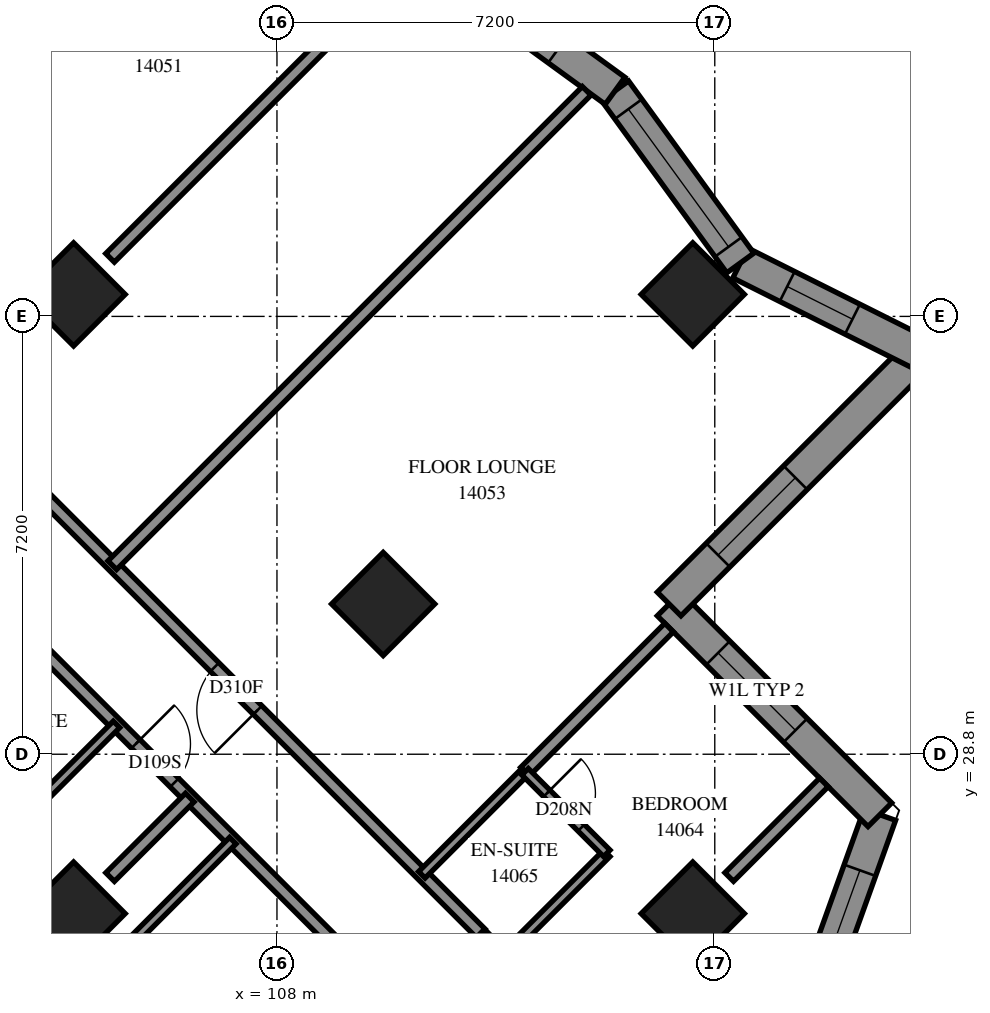
"""IFC4 building model, lengths in metres.
Left out: names, types, materials, properties, quantities, classifications, styles, units other than length and angle.
Written with IfcOpenShell. Run it as: python <this file> out.ifc"""

import sys

from ifc_helpers import new_model, si_unit, direction, frame, frame_2d, origin, origin_2d, place, context, subcontext, project, spatial, polyline, rectangle, outline, extrude, element, fill, save


model = new_model("IFC4")
c1 = context("Model", 3, precision=1e-05, world=origin(), true_north=direction((0.0, 1.0)))
c2 = subcontext(c1, "Body", "Model", "MODEL_VIEW")
j1 = project(units=[si_unit("LENGTHUNIT", "METRE"), si_unit("PLANEANGLEUNIT", "RADIAN")], contexts=[c1])
p1 = place(None, origin())
s1 = spatial("IfcSite", under=j1, at=p1, CompositionType="ELEMENT")
p2 = place(p1, origin())
s2 = spatial("IfcBuilding", under=s1, at=p2, CompositionType="ELEMENT")
p3 = place(p2, frame((0.0, 0.0, 54.2)))
s3 = spatial("IfcBuildingStorey", under=s2, at=p3, CompositionType="ELEMENT", Elevation=54.2)
for number, where, z_axis, x_axis in (
    (1, (104.656, 36.362, 0.0), (0.0, 0.0, 1.0), (0.707, -0.707, 0.0)),
    (2, (114.838, 36.362, 0.0), (0.0, 0.0, 1.0), (0.707, -0.707, 0.0)),
    (3, (109.747, 31.271, 0.0), (0.0, 0.0, 1.0), (0.707, -0.707, 0.0)),
    (4, (104.656, 26.18, 0.0), (0.0, 0.0, 1.0), (0.707, -0.707, 0.0)),
    (5, (114.838, 26.18, 0.0), (0.0, 0.0, 1.0), (0.707, -0.707, 0.0)),
):
    element("IfcColumn", number, at=place(p3, frame(where, z_axis=z_axis, x_axis=x_axis)), inside=s3, PredefinedType="COLUMN", context=c2, shape_type="SweptSolid", body=[
        extrude(rectangle(XDim=1.2, YDim=1.2, at=origin_2d()), origin(), (0.0, 0.0, 1.0), 3.1),
    ])
p4 = place(p3, frame((116.117, 22.793, 0.0), z_axis=(0.0, 0.0, 1.0), x_axis=(0.3376911299, 0.9412569791, 0.0)))
e6 = element("IfcWall", 6, at=p4, inside=s3, PredefinedType="SOLIDWALL", context=c2, shape_type="SweptSolid", body=[
    extrude(outline(polyline([(-0.124, -0.275), (5.499, -0.275), (5.15, 0.275), (0.124, 0.275), (-0.124, -0.275)])), origin(), (0.0, 0.0, 1.0), 3.1),
])
p5 = place(p4, frame((0.841, 0.0, 0.5)))
e7 = element("IfcOpeningElement", 7, at=p5, cuts=e6, PredefinedType="OPENING", context=c2, shape_type="SweptSolid", body=[
    extrude(rectangle(XDim=1.2, YDim=2.45, at=frame_2d((0.6, 1.225))), frame((0.0, 0.285, 0.0), z_axis=(0.0, -1.0, 0.0), x_axis=(1.0, 0.0, 0.0)), (0.0, 0.0, 1.0), 0.57),
])
p6 = place(p4, frame((3.154, 0.0, 0.5)))
e8 = element("IfcOpeningElement", 8, at=p6, cuts=e6, PredefinedType="OPENING", context=c2, shape_type="SweptSolid", body=[
    extrude(rectangle(XDim=1.2, YDim=2.45, at=frame_2d((0.6, 1.225))), frame((0.0, 0.285, 0.0), z_axis=(0.0, -1.0, 0.0), x_axis=(1.0, 0.0, 0.0)), (0.0, 0.0, 1.0), 0.57),
])
p7 = place(p3, frame((117.915, 27.805, 0.0), z_axis=(0.0, 0.0, 1.0), x_axis=(-0.7071067812, 0.7071067812, 0.0)))
e9 = element("IfcWall", 9, at=p7, inside=s3, PredefinedType="SOLIDWALL", context=c2, shape_type="SweptSolid", body=[
    extrude(outline(polyline([(-0.174, -0.275), (4.626, -0.275), (5.176, 0.275), (0.174, 0.275), (-0.174, -0.275)])), origin(), (0.0, 0.0, 1.0), 3.1),
])
p8 = place(p7, frame((1.963, 0.0, 0.6)))
e10 = element("IfcOpeningElement", 10, at=p8, cuts=e9, PredefinedType="OPENING", context=c2, shape_type="SweptSolid", body=[
    extrude(rectangle(XDim=1.8, YDim=1.9, at=frame_2d((0.9, 0.95))), frame((0.0, 0.285, 0.0), z_axis=(0.0, -1.0, 0.0), x_axis=(1.0, 0.0, 0.0)), (0.0, 0.0, 1.0), 0.57),
])
p9 = place(p3, frame((114.449, 31.271, 0.0), z_axis=(0.0, 0.0, 1.0), x_axis=(0.7070982134, 0.7071153489, 0.0)))
e11 = element("IfcWall", 11, at=p9, inside=s3, PredefinedType="SOLIDWALL", context=c2, shape_type="SweptSolid", body=[
    extrude(outline(polyline([(0.275, -0.275), (6.217, -0.275), (5.455, 0.275), (-0.275, 0.275), (0.275, -0.275)])), origin(), (0.0, 0.0, 1.0), 3.1),
])
p10 = place(p9, frame((1.137, 0.0, 0.6)))
e12 = element("IfcOpeningElement", 12, at=p10, cuts=e11, PredefinedType="OPENING", context=c2, shape_type="SweptSolid", body=[
    extrude(rectangle(XDim=1.8, YDim=1.9, at=frame_2d((0.9, 0.95))), frame((0.0, 0.285, 0.0), z_axis=(0.0, -1.0, 0.0), x_axis=(1.0, 0.0, 0.0)), (0.0, 0.0, 1.0), 0.57),
])
p11 = place(p3, frame((118.576, 35.397, 0.0), z_axis=(0.0, 0.0, 1.0), x_axis=(-0.8940457648, 0.4479756359, 0.0)))
e13 = element("IfcWall", 13, at=p11, inside=s3, PredefinedType="SOLIDWALL", context=c2, shape_type="SweptSolid", body=[
    extrude(outline(polyline([(-0.381, -0.275), (3.239, -0.275), (3.373, 0.275), (0.381, 0.275), (-0.381, -0.275)])), origin(), (0.0, 0.0, 1.0), 3.1),
])
p12 = place(p11, frame((1.244, 0.0, 0.5)))
e14 = element("IfcOpeningElement", 14, at=p12, cuts=e13, PredefinedType="OPENING", context=c2, shape_type="SweptSolid", body=[
    extrude(rectangle(XDim=1.2, YDim=2.45, at=frame_2d((0.6, 1.225))), frame((0.0, 0.285, 0.0), z_axis=(0.0, -1.0, 0.0), x_axis=(1.0, 0.0, 0.0)), (0.0, 0.0, 1.0), 0.57),
])
p13 = place(p3, frame((115.62, 36.878, 0.0), z_axis=(0.0, 0.0, 1.0), x_axis=(-0.5882752751, 0.8086607451, 0.0)))
e15 = element("IfcWall", 15, at=p13, inside=s3, PredefinedType="SOLIDWALL", context=c2, shape_type="SweptSolid", body=[
    extrude(outline(polyline([(0.067, -0.275), (3.545, -0.275), (3.458, 0.275), (-0.067, 0.275), (0.067, -0.275)])), origin(), (0.0, 0.0, 1.0), 3.1),
])
p14 = place(p13, frame((0.329, 0.0, 0.5)))
e16 = element("IfcOpeningElement", 16, at=p14, cuts=e15, PredefinedType="OPENING", context=c2, shape_type="SweptSolid", body=[
    extrude(rectangle(XDim=2.8, YDim=2.45, at=frame_2d((1.4, 1.225))), frame((0.0, 0.285, 0.0), z_axis=(0.0, -1.0, 0.0), x_axis=(1.0, 0.0, 0.0)), (0.0, 0.0, 1.0), 0.57),
])
p15 = place(p3, frame((113.56, 39.71, 0.0), z_axis=(0.0, 0.0, 1.0), x_axis=(-0.8086577494, 0.5882793931, 0.0)))
e17 = element("IfcWall", 17, at=p15, inside=s3, PredefinedType="SOLIDWALL", context=c2, shape_type="SweptSolid", body=[
    extrude(outline(polyline([(-0.043, -0.275), (3.435, -0.275), (3.522, 0.275), (0.043, 0.275), (-0.043, -0.275)])), origin(), (0.0, 0.0, 1.0), 3.1),
])
p16 = place(p15, frame((1.161, 0.0, 0.5)))
e18 = element("IfcOpeningElement", 18, at=p16, cuts=e17, PredefinedType="OPENING", context=c2, shape_type="SweptSolid", body=[
    extrude(rectangle(XDim=1.2, YDim=2.45, at=frame_2d((0.6, 1.225))), frame((0.0, 0.285, 0.0), z_axis=(0.0, -1.0, 0.0), x_axis=(1.0, 0.0, 0.0)), (0.0, 0.0, 1.0), 0.57),
])
p17 = place(p3, frame((93.481, 41.167, 0.0), z_axis=(0.0, 0.0, 1.0), x_axis=(0.7071067812, -0.7071067812, 0.0)))
e19 = element("IfcWall", 19, at=p17, inside=s3, PredefinedType="PARTITIONING", context=c2, shape_type="SweptSolid", body=[
    extrude(rectangle(XDim=25.699, YDim=0.2, at=frame_2d((12.85, 0.0))), origin(), (0.0, 0.0, 1.0), 3.1),
])
p18 = place(p17, frame((2.8, 0.0, 0.0)))
e20 = element("IfcOpeningElement", 20, at=p18, cuts=e19, PredefinedType="OPENING", context=c2, shape_type="SweptSolid", body=[
    extrude(rectangle(XDim=0.9, YDim=2.1, at=frame_2d((0.45, 1.05))), frame((0.0, 0.11, 0.0), z_axis=(0.0, -1.0, 0.0), x_axis=(1.0, 0.0, 0.0)), (0.0, 0.0, 1.0), 0.22),
])
p19 = place(p17, frame((9.948, 0.0, 0.0)))
e21 = element("IfcOpeningElement", 21, at=p19, cuts=e19, PredefinedType="OPENING", context=c2, shape_type="SweptSolid", body=[
    extrude(rectangle(XDim=0.9, YDim=2.1, at=frame_2d((0.45, 1.05))), frame((0.0, 0.11, 0.0), z_axis=(0.0, -1.0, 0.0), x_axis=(1.0, 0.0, 0.0)), (0.0, 0.0, 1.0), 0.22),
])
p20 = place(p17, frame((11.7, 0.0, 0.0)))
e22 = element("IfcOpeningElement", 22, at=p20, cuts=e19, PredefinedType="OPENING", context=c2, shape_type="SweptSolid", body=[
    extrude(rectangle(XDim=0.9, YDim=2.1, at=frame_2d((0.45, 1.05))), frame((0.0, 0.11, 0.0), z_axis=(0.0, -1.0, 0.0), x_axis=(1.0, 0.0, 0.0)), (0.0, 0.0, 1.0), 0.22),
])
p21 = place(p17, frame((17.25, 0.0, 0.0)))
e23 = element("IfcOpeningElement", 23, at=p21, cuts=e19, PredefinedType="OPENING", context=c2, shape_type="SweptSolid", body=[
    extrude(rectangle(XDim=0.9, YDim=2.1, at=frame_2d((0.45, 1.05))), frame((0.0, 0.11, 0.0), z_axis=(0.0, -1.0, 0.0), x_axis=(1.0, 0.0, 0.0)), (0.0, 0.0, 1.0), 0.22),
])
p22 = place(p17, frame((22.82, 0.0, 0.0)))
e24 = element("IfcOpeningElement", 24, at=p22, cuts=e19, PredefinedType="OPENING", context=c2, shape_type="SweptSolid", body=[
    extrude(rectangle(XDim=0.9, YDim=2.1, at=frame_2d((0.45, 1.05))), frame((0.0, 0.11, 0.0), z_axis=(0.0, -1.0, 0.0), x_axis=(1.0, 0.0, 0.0)), (0.0, 0.0, 1.0), 0.22),
])
p23 = place(p3, frame((111.352, 25.855, 0.0), z_axis=(0.0, 0.0, 1.0), x_axis=(-0.7070418597, 0.7071716967, 0.0)))
e25 = element("IfcWall", 25, at=p23, inside=s3, PredefinedType="PARTITIONING", context=c2, shape_type="SweptSolid", body=[
    extrude(rectangle(XDim=13.864, YDim=0.2, at=frame_2d((6.932, 0.0))), origin(), (0.0, 0.0, 1.0), 3.1),
])
p24 = place(p23, frame((12.564, 0.0, 0.0)))
e26 = element("IfcOpeningElement", 26, at=p24, cuts=e25, PredefinedType="OPENING", context=c2, shape_type="SweptSolid", body=[
    extrude(rectangle(XDim=0.9, YDim=2.1, at=frame_2d((0.45, 1.05))), frame((0.0, 0.11, 0.0), z_axis=(0.0, -1.0, 0.0), x_axis=(1.0, 0.0, 0.0)), (0.0, 0.0, 1.0), 0.22),
])
p25 = place(p23, frame((5.19, 0.0, 0.0)))
e27 = element("IfcOpeningElement", 27, at=p25, cuts=e25, PredefinedType="OPENING", context=c2, shape_type="SweptSolid", body=[
    extrude(rectangle(XDim=1.0, YDim=2.1, at=frame_2d((0.5, 1.05))), frame((0.0, 0.11, 0.0), z_axis=(0.0, -1.0, 0.0), x_axis=(1.0, 0.0, 0.0)), (0.0, 0.0, 1.0), 0.22),
])
p26 = place(p3, frame((105.292, 31.908, 0.0), z_axis=(0.0, 0.0, 1.0), x_axis=(0.7071067812, 0.7071067812, 0.0)))
e28 = element("IfcWall", 28, at=p26, inside=s3, PredefinedType="PARTITIONING", context=c2, shape_type="SweptSolid", body=[
    extrude(rectangle(XDim=11.033, YDim=0.2, at=frame_2d((5.516, 0.0))), origin(), (0.0, 0.0, 1.0), 3.1),
])
p27 = place(p3, frame((101.896, 38.698, 0.0), z_axis=(0.0, 0.0, 1.0), x_axis=(0.7072233116, 0.7069902315, 0.0)))
e29 = element("IfcWall", 29, at=p27, inside=s3, PredefinedType="PARTITIONING", context=c2, shape_type="SweptSolid", body=[
    extrude(rectangle(XDim=8.581, YDim=0.2, at=frame_2d((4.29, 0.0))), origin(), (0.0, 0.0, 1.0), 3.1),
])
p28 = place(p3, frame((105.255, 36.963, 0.0), z_axis=(0.0, 0.0, 1.0), x_axis=(0.7071067812, 0.7071067812, 0.0)))
e30 = element("IfcWall", 30, at=p28, inside=s3, PredefinedType="PARTITIONING", context=c2, shape_type="SweptSolid", body=[
    extrude(rectangle(XDim=5.504, YDim=0.2, at=frame_2d((2.752, 0.0))), origin(), (0.0, 0.0, 1.0), 3.1),
])
p29 = place(p3, frame((112.079, 28.513, 0.0), z_axis=(0.0, 0.0, 1.0), x_axis=(0.7071067812, 0.7071067812, 0.0)))
e31 = element("IfcWall", 31, at=p29, inside=s3, PredefinedType="PARTITIONING", context=c2, shape_type="SweptSolid", body=[
    extrude(rectangle(XDim=3.351, YDim=0.2, at=frame_2d((1.675, 0.0))), origin(), (0.0, 0.0, 1.0), 3.1),
])
p30 = place(p3, frame((111.725, 25.473, 0.0), z_axis=(0.0, 0.0, 1.0), x_axis=(0.7071067812, 0.7071067812, 0.0)))
e32 = element("IfcWall", 32, at=p30, inside=s3, PredefinedType="PARTITIONING", context=c2, shape_type="SweptSolid", body=[
    extrude(rectangle(XDim=2.401, YDim=0.15, at=frame_2d((1.201, 0.0))), origin(), (0.0, 0.0, 1.0), 3.1),
])
p31 = place(p3, frame((105.578, 25.682, 0.0), z_axis=(0.0, 0.0, 1.0), x_axis=(0.706689978, 0.7075233388, 0.0)))
e33 = element("IfcWall", 33, at=p31, inside=s3, PredefinedType="PARTITIONING", context=c2, shape_type="SweptSolid", body=[
    extrude(rectangle(XDim=2.4, YDim=0.15, at=frame_2d((1.2, 0.0))), origin(), (0.0, 0.0, 1.0), 3.1),
])
for number, where, z_axis, x_axis in (
    (34, (110.383, 26.817, 0.0), (0.0, 0.0, 1.0), (0.707, 0.707, 0.0)),
    (35, (103.665, 27.595, 0.0), (0.0, 0.0, 1.0), (0.707, 0.707, 0.0)),
):
    element("IfcWall", number, at=place(p3, frame(where, z_axis=z_axis, x_axis=x_axis)), inside=s3, PredefinedType="PARTITIONING", context=c2, shape_type="SweptSolid", body=[
        extrude(rectangle(XDim=2.398, YDim=0.15, at=frame_2d((1.199, 0.0))), origin(), (0.0, 0.0, 1.0), 3.1),
    ])
p32 = place(p3, frame((112.925, 24.267, 0.0), z_axis=(0.0, 0.0, 1.0), x_axis=(-0.7068383786, 0.707375082, 0.0)))
e36 = element("IfcWall", 36, at=p32, inside=s3, PredefinedType="PARTITIONING", context=c2, shape_type="SweptSolid", body=[
    extrude(rectangle(XDim=2.236, YDim=0.2, at=frame_2d((1.118, 0.0))), origin(), (0.0, 0.0, 1.0), 3.1),
])
p33 = place(p32, frame((0.4, 0.0, 0.0)))
e37 = element("IfcOpeningElement", 37, at=p33, cuts=e36, PredefinedType="OPENING", context=c2, shape_type="SweptSolid", body=[
    extrude(rectangle(XDim=0.9, YDim=2.1, at=frame_2d((0.45, 1.05))), frame((0.0, 0.11, 0.0), z_axis=(0.0, -1.0, 0.0), x_axis=(1.0, 0.0, 0.0)), (0.0, 0.0, 1.0), 0.22),
])
p34 = place(p3, frame((115.438, 26.78, 0.0), z_axis=(0.0, 0.0, 1.0), x_axis=(0.7071067812, 0.7071067812, 0.0)))
e38 = element("IfcWall", 38, at=p34, inside=s3, PredefinedType="PARTITIONING", context=c2, shape_type="SweptSolid", body=[
    extrude(rectangle(XDim=2.201, YDim=0.2, at=frame_2d((1.101, 0.0))), origin(), (0.0, 0.0, 1.0), 3.1),
])
p35 = place(p3, frame((112.08, 28.512, 0.0), z_axis=(0.0, 0.0, 1.0), x_axis=(0.7076330979, -0.7065800724, 0.0)))
e39 = element("IfcWall", 39, at=p35, inside=s3, PredefinedType="PARTITIONING", context=c2, shape_type="SweptSolid", body=[
    extrude(rectangle(XDim=1.899, YDim=0.15, at=frame_2d((0.95, 0.0))), origin(), (0.0, 0.0, 1.0), 3.1),
])
p36 = place(p35, frame((0.505, 0.0, 0.0)))
e40 = element("IfcOpeningElement", 40, at=p36, cuts=e39, PredefinedType="OPENING", context=c2, shape_type="SweptSolid", body=[
    extrude(rectangle(XDim=0.8, YDim=2.1, at=frame_2d((0.4, 1.05))), frame((0.0, 0.085, 0.0), z_axis=(0.0, -1.0, 0.0), x_axis=(1.0, 0.0, 0.0)), (0.0, 0.0, 1.0), 0.17),
])
p37 = place(p3, frame((105.256, 26.78, 0.0), z_axis=(0.0, 0.0, 1.0), x_axis=(0.7076467632, 0.7065663865, 0.0)))
e41 = element("IfcWall", 41, at=p37, inside=s3, PredefinedType="PARTITIONING", context=c2, shape_type="SweptSolid", body=[
    extrude(rectangle(XDim=1.851, YDim=0.2, at=frame_2d((0.926, 0.0))), origin(), (0.0, 0.0, 1.0), 3.1),
])
p38 = place(p6, origin())
e42 = element("IfcWindow", 42, at=p38, inside=s3, PartitioningType="SINGLE_PANEL", PredefinedType="WINDOW", context=c2, shape_type="SweptSolid", body=[
    extrude(rectangle(XDim=1.2, YDim=2.45, at=frame_2d((0.6, 1.225))), frame((0.0, 0.155, 0.0), z_axis=(0.0, -1.0, 0.0), x_axis=(1.0, 0.0, 0.0)), (0.0, 0.0, 1.0), 0.06),
])
fill(e8, e42)
p39 = place(p8, origin())
e43 = element("IfcWindow", 43, at=p39, inside=s3, PartitioningType="SINGLE_PANEL", PredefinedType="WINDOW", context=c2, shape_type="SweptSolid", body=[
    extrude(rectangle(XDim=1.8, YDim=1.9, at=frame_2d((0.9, 0.95))), frame((0.0, 0.155, 0.0), z_axis=(0.0, -1.0, 0.0), x_axis=(1.0, 0.0, 0.0)), (0.0, 0.0, 1.0), 0.06),
])
fill(e10, e43)
p40 = place(p10, origin())
e44 = element("IfcWindow", 44, at=p40, inside=s3, PartitioningType="SINGLE_PANEL", PredefinedType="WINDOW", context=c2, shape_type="SweptSolid", body=[
    extrude(rectangle(XDim=1.8, YDim=1.9, at=frame_2d((0.9, 0.95))), frame((0.0, 0.155, 0.0), z_axis=(0.0, -1.0, 0.0), x_axis=(1.0, 0.0, 0.0)), (0.0, 0.0, 1.0), 0.06),
])
fill(e12, e44)
p41 = place(p12, origin())
e45 = element("IfcWindow", 45, at=p41, inside=s3, PartitioningType="SINGLE_PANEL", PredefinedType="WINDOW", context=c2, shape_type="SweptSolid", body=[
    extrude(rectangle(XDim=1.2, YDim=2.45, at=frame_2d((0.6, 1.225))), frame((0.0, 0.155, 0.0), z_axis=(0.0, -1.0, 0.0), x_axis=(1.0, 0.0, 0.0)), (0.0, 0.0, 1.0), 0.06),
])
fill(e14, e45)
p42 = place(p14, origin())
e46 = element("IfcWindow", 46, at=p42, inside=s3, PartitioningType="SINGLE_PANEL", PredefinedType="WINDOW", context=c2, shape_type="SweptSolid", body=[
    extrude(rectangle(XDim=2.8, YDim=2.45, at=frame_2d((1.4, 1.225))), frame((0.0, 0.155, 0.0), z_axis=(0.0, -1.0, 0.0), x_axis=(1.0, 0.0, 0.0)), (0.0, 0.0, 1.0), 0.06),
])
fill(e16, e46)
p43 = place(p16, origin())
e47 = element("IfcWindow", 47, at=p43, inside=s3, PartitioningType="SINGLE_PANEL", PredefinedType="WINDOW", context=c2, shape_type="SweptSolid", body=[
    extrude(rectangle(XDim=1.2, YDim=2.45, at=frame_2d((0.6, 1.225))), frame((0.0, 0.155, 0.0), z_axis=(0.0, -1.0, 0.0), x_axis=(1.0, 0.0, 0.0)), (0.0, 0.0, 1.0), 0.06),
])
fill(e18, e47)
p44 = place(p25, origin())
e48 = element("IfcDoor", 48, at=p44, inside=s3, OperationType="SINGLE_SWING_RIGHT", PredefinedType="DOOR", context=c2, shape_type="SweptSolid", body=[
    extrude(rectangle(XDim=1.0, YDim=2.1, at=frame_2d((0.5, 1.05))), frame((0.0, 0.025, 0.0), z_axis=(0.0, -1.0, 0.0), x_axis=(1.0, 0.0, 0.0)), (0.0, 0.0, 1.0), 0.05),
])
fill(e27, e48)
p45 = place(p21, origin())
e49 = element("IfcDoor", 49, at=p45, inside=s3, OperationType="SINGLE_SWING_LEFT", PredefinedType="DOOR", context=c2, shape_type="SweptSolid", body=[
    extrude(rectangle(XDim=0.9, YDim=2.1, at=frame_2d((0.45, 1.05))), frame((0.0, 0.025, 0.0), z_axis=(0.0, -1.0, 0.0), x_axis=(1.0, 0.0, 0.0)), (0.0, 0.0, 1.0), 0.05),
])
fill(e23, e49)
p46 = place(p36, origin())
e50 = element("IfcDoor", 50, at=p46, inside=s3, OperationType="SINGLE_SWING_RIGHT", PredefinedType="DOOR", context=c2, shape_type="SweptSolid", body=[
    extrude(rectangle(XDim=0.8, YDim=2.1, at=frame_2d((0.4, 1.05))), frame((0.0, 0.025, 0.0), z_axis=(0.0, -1.0, 0.0), x_axis=(1.0, 0.0, 0.0)), (0.0, 0.0, 1.0), 0.05),
])
fill(e40, e50)
save(model, sys.argv[1])
